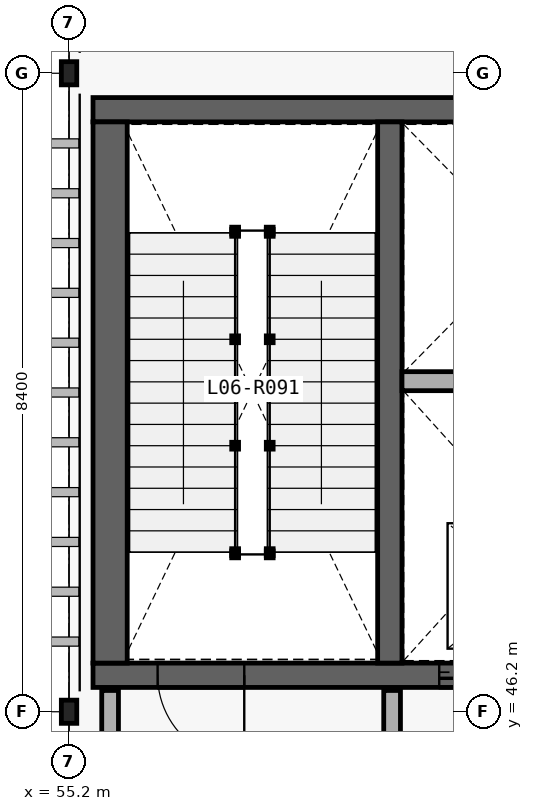
"""IFC4 building model, lengths in metres.
Left out: names, types, materials, properties, quantities, classifications, styles, units other than length and angle.
Written with IfcOpenShell. Run it as: python <this file> out.ifc"""

import sys

from ifc_helpers import new_model, si_unit, direction, frame, frame_2d, origin_with_axes, origin_2d_with_axis, place, context, subcontext, project, spatial, rectangle, hollow_rectangle, extrude, element, fill, save


model = new_model("IFC4")
c1 = context("Model", 3, precision=1e-05, world=origin_with_axes(), true_north=direction((0.0, 1.0)))
c2 = subcontext(c1, "Body", "Model", "MODEL_VIEW")
j1 = project(units=[si_unit("LENGTHUNIT", "METRE"), si_unit("PLANEANGLEUNIT", "RADIAN")], contexts=[c1])
p1 = place(None, origin_with_axes())
s1 = spatial("IfcSite", under=j1, at=p1, CompositionType="ELEMENT")
p2 = place(p1, origin_with_axes())
s2 = spatial("IfcBuilding", under=s1, at=p2, CompositionType="ELEMENT")
p3 = place(p2, frame((0.0, 0.0, 29.7), z_axis=(0.0, 0.0, 1.0), x_axis=(1.0, 0.0, 0.0)))
s3 = spatial("IfcBuildingStorey", under=s2, at=p3, CompositionType="ELEMENT", Elevation=29.7)
p4 = place(None, frame((55.515, 46.68, 29.7), z_axis=(0.0, 0.0, 1.0), x_axis=(1.0, 0.0, 0.0)))
e1 = element("IfcWall", 1, at=p4, inside=s3, PredefinedType="SHEAR", context=c2, shape_type="SweptSolid", body=[
    extrude(rectangle(XDim=7.77, YDim=0.32, at=frame_2d((3.885, 0.0), x_axis=(1.0, 0.0))), origin_with_axes(), (0.0, 0.0, 1.0), 4.8),
])
p5 = place(None, frame((56.935, 46.68, 29.7), z_axis=(0.0, 0.0, 1.0), x_axis=(1.0, 0.0, 0.0)))
e2 = element("IfcOpeningElement", 2, at=p5, cuts=e1, PredefinedType="OPENING", context=c2, shape_type="SweptSolid", body=[
    extrude(rectangle(XDim=1.14, YDim=2.18, at=frame_2d((0.0, 1.09), x_axis=(1.0, 0.0))), frame((0.0, 0.17, 0.0), z_axis=(0.0, -1.0, 0.0), x_axis=(1.0, 0.0, 0.0)), (0.0, 0.0, 1.0), 0.34),
])
p6 = place(None, frame((60.65, 46.68, 29.7), z_axis=(0.0, 0.0, 1.0), x_axis=(1.0, 0.0, 0.0)))
e3 = element("IfcOpeningElement", 3, at=p6, cuts=e1, PredefinedType="OPENING", context=c2, shape_type="SweptSolid", body=[
    extrude(rectangle(XDim=1.16, YDim=2.2, at=frame_2d((0.0, 1.1), x_axis=(1.0, 0.0))), frame((0.0, 0.17, 0.0), z_axis=(0.0, -1.0, 0.0), x_axis=(1.0, 0.0, 0.0)), (0.0, 0.0, 1.0), 0.34),
])
p7 = place(None, frame((63.285, 54.12, 29.7), z_axis=(0.0, 0.0, 1.0), x_axis=(-1.0, 0.0, 0.0)))
e4 = element("IfcWall", 4, at=p7, inside=s3, PredefinedType="SHEAR", context=c2, shape_type="SweptSolid", body=[
    extrude(rectangle(XDim=7.77, YDim=0.32, at=frame_2d((3.885, 0.0), x_axis=(1.0, 0.0))), origin_with_axes(), (0.0, 0.0, 1.0), 4.8),
])
p8 = place(None, frame((55.74, 53.96, 29.7), z_axis=(0.0, 0.0, 1.0), x_axis=(0.0, -1.0, 0.0)))
e5 = element("IfcWall", 5, at=p8, inside=s3, PredefinedType="SHEAR", context=c2, shape_type="SweptSolid", body=[
    extrude(rectangle(XDim=7.12, YDim=0.45, at=frame_2d((3.56, 0.0), x_axis=(1.0, 0.0))), origin_with_axes(), (0.0, 0.0, 1.0), 4.8),
])
p9 = place(None, frame((59.42, 46.84, 29.7), z_axis=(0.0, 0.0, 1.0), x_axis=(0.0, 1.0, 0.0)))
e6 = element("IfcWall", 6, at=p9, inside=s3, PredefinedType="SHEAR", context=c2, shape_type="SweptSolid", body=[
    extrude(rectangle(XDim=7.12, YDim=0.32, at=frame_2d((3.56, 0.0), x_axis=(1.0, 0.0))), origin_with_axes(), (0.0, 0.0, 1.0), 4.8),
])
p10 = place(None, frame((59.58, 50.549, 29.7), z_axis=(0.0, 0.0, 1.0), x_axis=(1.0, 0.0, 0.0)))
e7 = element("IfcWall", 7, at=p10, inside=s3, PredefinedType="PARTITIONING", context=c2, shape_type="SweptSolid", body=[
    extrude(rectangle(XDim=3.255, YDim=0.25, at=frame_2d((1.627, 0.0), x_axis=(1.0, 0.0))), origin_with_axes(), (0.0, 0.0, 1.0), 4.48),
])
for number, where, z_axis, x_axis in (
    (8, (55.74, 45.22, 29.7), (0.0, 0.0, 1.0), (0.0, 1.0, 0.0)),
    (9, (59.45, 45.22, 29.7), (0.0, 0.0, 1.0), (0.0, 1.0, 0.0)),
):
    element("IfcWall", number, at=place(None, frame(where, z_axis=z_axis, x_axis=x_axis)), inside=s3, PredefinedType="PARTITIONING", context=c2, shape_type="SweptSolid", body=[
        extrude(rectangle(XDim=1.26, YDim=0.22, at=frame_2d((0.63, 0.0), x_axis=(1.0, 0.0))), origin_with_axes(), (0.0, 0.0, 1.0), 4.48),
    ])
for number, where, z_axis, x_axis in (
    (10, (55.2, 46.2, 29.7), (0.0, 0.0, 1.0), (1.0, 0.0, 0.0)),
    (11, (55.2, 54.6, 29.7), (0.0, 0.0, 1.0), (1.0, 0.0, 0.0)),
):
    element("IfcColumn", number, at=place(None, frame(where, z_axis=z_axis, x_axis=x_axis)), inside=s3, PredefinedType="COLUMN", context=c2, shape_type="SweptSolid", body=[
        extrude(hollow_rectangle(XDim=0.203, YDim=0.305, WallThickness=0.013, InnerFilletRadius=0.025, OuterFilletRadius=0.013, at=origin_2d_with_axis()), origin_with_axes(), (0.0, 0.0, 1.0), 4.8),
    ])
p11 = place(None, frame((56.935, 46.68, 29.7), z_axis=(0.0, 0.0, 1.0), x_axis=(-1.0, 0.0, 0.0)))
e12 = element("IfcDoor", 12, at=p11, inside=s3, OperationType="SINGLE_SWING_RIGHT", PredefinedType="DOOR", context=c2, shape_type="SweptSolid", body=[
    extrude(rectangle(XDim=1.14, YDim=2.18, at=frame_2d((0.0, 1.09), x_axis=(1.0, 0.0))), frame((0.0, 0.04, 0.0), z_axis=(0.0, -1.0, 0.0), x_axis=(1.0, 0.0, 0.0)), (0.0, 0.0, 1.0), 0.08),
])
fill(e2, e12)
p12 = place(None, frame((60.65, 46.68, 29.7), z_axis=(0.0, 0.0, 1.0), x_axis=(-1.0, 0.0, 0.0)))
e13 = element("IfcDoor", 13, at=p12, inside=s3, OperationType="SLIDING_TO_LEFT", PredefinedType="DOOR", context=c2, shape_type="SweptSolid", body=[
    extrude(rectangle(XDim=1.16, YDim=2.2, at=frame_2d((0.0, 1.1), x_axis=(1.0, 0.0))), frame((0.0, 0.04, 0.0), z_axis=(0.0, -1.0, 0.0), x_axis=(1.0, 0.0, 0.0)), (0.0, 0.0, 1.0), 0.08),
])
fill(e3, e13)
save(model, sys.argv[1])
